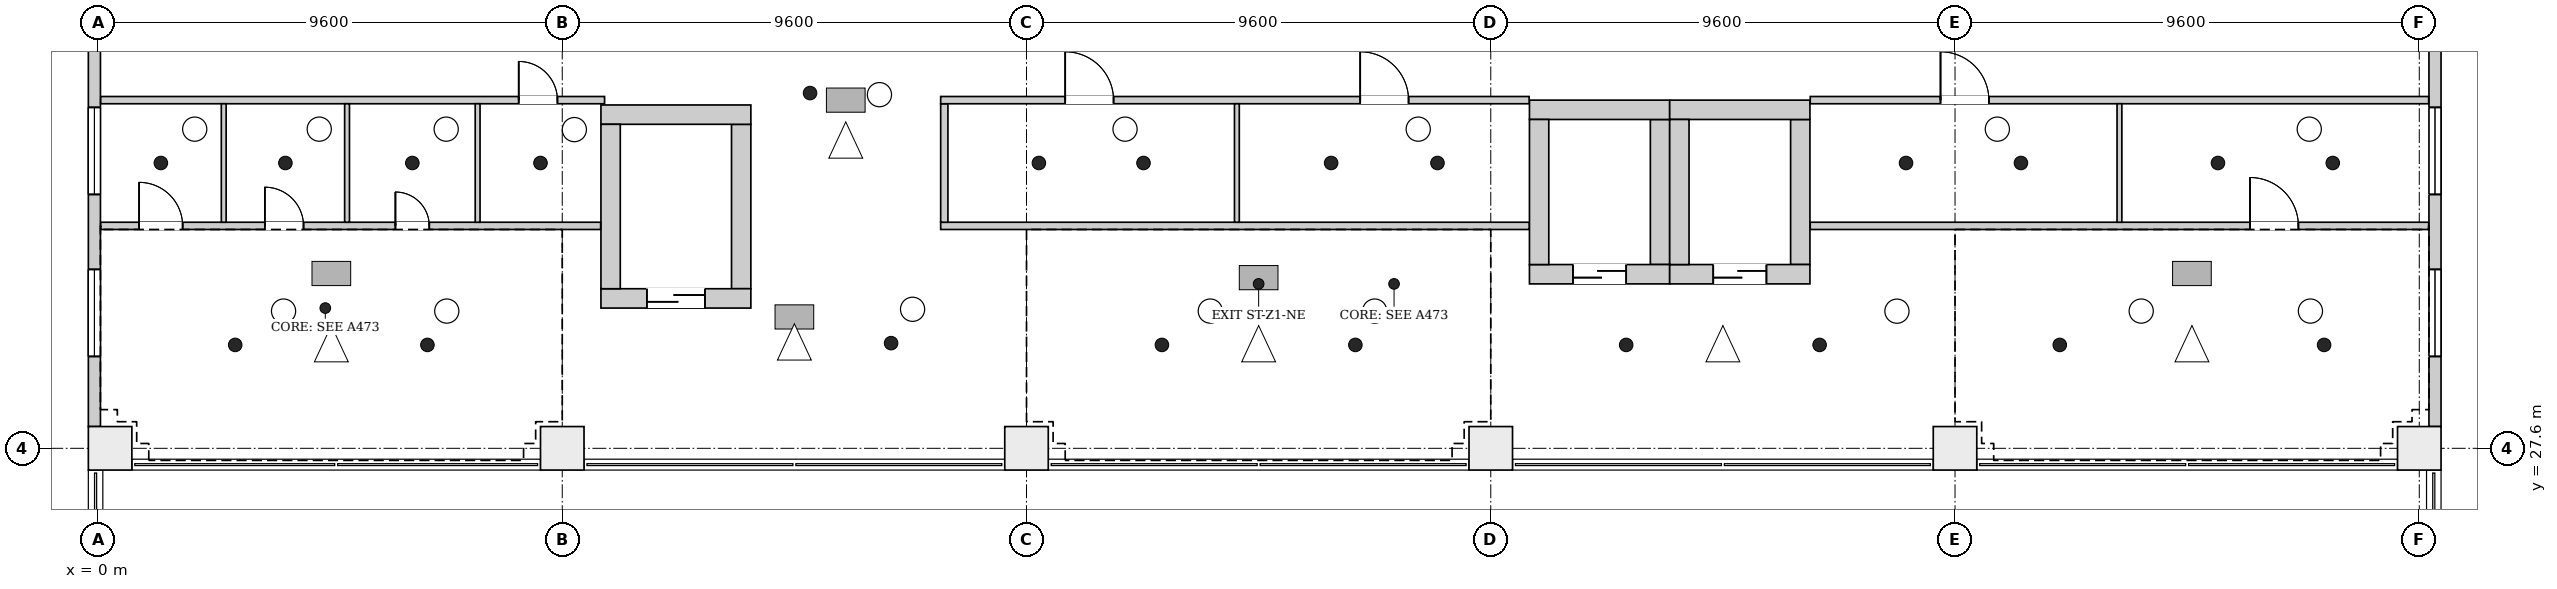
"""IFC4 building model, lengths in metres.
Left out: names, types, materials, properties, quantities, classifications, styles, units other than length and angle.
Written with IfcOpenShell. Run it as: python <this file> out.ifc"""

import sys

from ifc_helpers import new_model, si_unit, direction, frame, frame_2d, origin, origin_2d, place, context, subcontext, project, spatial, rectangle, extrude, element, fill, save


model = new_model("IFC4")
c1 = context("Model", 3, precision=1e-05, world=origin(), true_north=direction((0.0, 1.0)))
c2 = subcontext(c1, "Body", "Model", "MODEL_VIEW")
j1 = project(units=[si_unit("LENGTHUNIT", "METRE"), si_unit("PLANEANGLEUNIT", "RADIAN")], contexts=[c1])
p1 = place(None, origin())
s1 = spatial("IfcSite", under=j1, at=p1, CompositionType="ELEMENT")
p2 = place(p1, origin())
s2 = spatial("IfcBuilding", under=s1, at=p2, CompositionType="ELEMENT")
p3 = place(p2, frame((0.0, 0.0, 44.5)))
s3 = spatial("IfcBuildingStorey", under=s2, at=p3, CompositionType="ELEMENT", Elevation=44.5)
p4 = place(p3, frame((10.4, 30.7, 0.0), z_axis=(0.0, 0.0, 1.0), x_axis=(1.0, 0.0, 0.0)))
e1 = element("IfcWall", 1, at=p4, inside=s3, PredefinedType="SHEAR", context=c2, shape_type="SweptSolid", body=[
    extrude(rectangle(XDim=3.1, YDim=0.4, at=frame_2d((1.55, 0.0))), origin(), (0.0, 0.0, 1.0), 4.2),
])
p5 = place(p4, frame((0.95, 0.0, 0.0)))
e2 = element("IfcOpeningElement", 2, at=p5, cuts=e1, PredefinedType="OPENING", context=c2, shape_type="SweptSolid", body=[
    extrude(rectangle(XDim=1.2, YDim=2.1, at=frame_2d((0.6, 1.05))), frame((0.0, 0.21, 0.0), z_axis=(0.0, -1.0, 0.0), x_axis=(1.0, 0.0, 0.0)), (0.0, 0.0, 1.0), 0.42),
])
p6 = place(p3, frame((10.4, 34.5, 0.0), z_axis=(0.0, 0.0, 1.0), x_axis=(1.0, 0.0, 0.0)))
e3 = element("IfcWall", 3, at=p6, inside=s3, PredefinedType="SHEAR", context=c2, shape_type="SweptSolid", body=[
    extrude(rectangle(XDim=3.1, YDim=0.4, at=frame_2d((1.55, 0.0))), origin(), (0.0, 0.0, 1.0), 4.2),
])
for number, where, z_axis, x_axis in (
    (4, (10.6, 30.9, 0.0), (0.0, 0.0, 1.0), (0.0, 1.0, 0.0)),
    (5, (13.3, 30.9, 0.0), (0.0, 0.0, 1.0), (0.0, 1.0, 0.0)),
):
    element("IfcWall", number, at=place(p3, frame(where, z_axis=z_axis, x_axis=x_axis)), inside=s3, PredefinedType="SHEAR", context=c2, shape_type="SweptSolid", body=[
        extrude(rectangle(XDim=3.4, YDim=0.4, at=frame_2d((1.7, 0.0))), origin(), (0.0, 0.0, 1.0), 4.2),
    ])
p7 = place(p3, frame((29.6, 31.2, 0.0), z_axis=(0.0, 0.0, 1.0), x_axis=(1.0, 0.0, 0.0)))
e6 = element("IfcWall", 6, at=p7, inside=s3, PredefinedType="SHEAR", context=c2, shape_type="SweptSolid", body=[
    extrude(rectangle(XDim=2.9, YDim=0.4, at=frame_2d((1.45, 0.0))), origin(), (0.0, 0.0, 1.0), 4.2),
])
p8 = place(p7, frame((0.9, 0.0, 0.0)))
e7 = element("IfcOpeningElement", 7, at=p8, cuts=e6, PredefinedType="OPENING", context=c2, shape_type="SweptSolid", body=[
    extrude(rectangle(XDim=1.1, YDim=2.1, at=frame_2d((0.55, 1.05))), frame((0.0, 0.21, 0.0), z_axis=(0.0, -1.0, 0.0), x_axis=(1.0, 0.0, 0.0)), (0.0, 0.0, 1.0), 0.42),
])
p9 = place(p3, frame((29.6, 34.6, 0.0), z_axis=(0.0, 0.0, 1.0), x_axis=(1.0, 0.0, 0.0)))
e8 = element("IfcWall", 8, at=p9, inside=s3, PredefinedType="SHEAR", context=c2, shape_type="SweptSolid", body=[
    extrude(rectangle(XDim=2.9, YDim=0.4, at=frame_2d((1.45, 0.0))), origin(), (0.0, 0.0, 1.0), 4.2),
])
for number, where, z_axis, x_axis in (
    (9, (29.8, 31.4, 0.0), (0.0, 0.0, 1.0), (0.0, 1.0, 0.0)),
    (10, (32.3, 31.4, 0.0), (0.0, 0.0, 1.0), (0.0, 1.0, 0.0)),
):
    element("IfcWall", number, at=place(p3, frame(where, z_axis=z_axis, x_axis=x_axis)), inside=s3, PredefinedType="SHEAR", context=c2, shape_type="SweptSolid", body=[
        extrude(rectangle(XDim=3.0, YDim=0.4, at=frame_2d((1.5, 0.0))), origin(), (0.0, 0.0, 1.0), 4.2),
    ])
p10 = place(p3, frame((32.5, 31.2, 0.0), z_axis=(0.0, 0.0, 1.0), x_axis=(1.0, 0.0, 0.0)))
e11 = element("IfcWall", 11, at=p10, inside=s3, PredefinedType="SHEAR", context=c2, shape_type="SweptSolid", body=[
    extrude(rectangle(XDim=2.9, YDim=0.4, at=frame_2d((1.45, 0.0))), origin(), (0.0, 0.0, 1.0), 4.2),
])
p11 = place(p10, frame((0.9, 0.0, 0.0)))
e12 = element("IfcOpeningElement", 12, at=p11, cuts=e11, PredefinedType="OPENING", context=c2, shape_type="SweptSolid", body=[
    extrude(rectangle(XDim=1.1, YDim=2.1, at=frame_2d((0.55, 1.05))), frame((0.0, 0.21, 0.0), z_axis=(0.0, -1.0, 0.0), x_axis=(1.0, 0.0, 0.0)), (0.0, 0.0, 1.0), 0.42),
])
p12 = place(p3, frame((32.5, 34.6, 0.0), z_axis=(0.0, 0.0, 1.0), x_axis=(1.0, 0.0, 0.0)))
e13 = element("IfcWall", 13, at=p12, inside=s3, PredefinedType="SHEAR", context=c2, shape_type="SweptSolid", body=[
    extrude(rectangle(XDim=2.9, YDim=0.4, at=frame_2d((1.45, 0.0))), origin(), (0.0, 0.0, 1.0), 4.2),
])
for number, where, z_axis, x_axis in (
    (14, (32.7, 31.4, 0.0), (0.0, 0.0, 1.0), (0.0, 1.0, 0.0)),
    (15, (35.2, 31.4, 0.0), (0.0, 0.0, 1.0), (0.0, 1.0, 0.0)),
):
    element("IfcWall", number, at=place(p3, frame(where, z_axis=z_axis, x_axis=x_axis)), inside=s3, PredefinedType="SHEAR", context=c2, shape_type="SweptSolid", body=[
        extrude(rectangle(XDim=3.0, YDim=0.4, at=frame_2d((1.5, 0.0))), origin(), (0.0, 0.0, 1.0), 4.2),
    ])
for number, where, z_axis, x_axis in (
    (16, (0.25, 27.6, 0.0), (0.0, 0.0, 1.0), (1.0, 0.0, 0.0)),
    (17, (9.6, 27.6, 0.0), (0.0, 0.0, 1.0), (1.0, 0.0, 0.0)),
    (18, (19.2, 27.6, 0.0), (0.0, 0.0, 1.0), (1.0, 0.0, 0.0)),
    (19, (28.8, 27.6, 0.0), (0.0, 0.0, 1.0), (1.0, 0.0, 0.0)),
    (20, (38.4, 27.6, 0.0), (0.0, 0.0, 1.0), (1.0, 0.0, 0.0)),
    (21, (48.0, 27.6, 0.0), (0.0, 0.0, 1.0), (1.0, 0.0, 0.0)),
):
    element("IfcColumn", number, at=place(p3, frame(where, z_axis=z_axis, x_axis=x_axis)), inside=s3, PredefinedType="COLUMN", context=c2, shape_type="SweptSolid", body=[
        extrude(rectangle(XDim=0.9, YDim=0.9, at=origin_2d()), origin(), (0.0, 0.0, 1.0), 4.2),
    ])
p13 = place(p3, frame((-0.074, 36.35, 0.0), z_axis=(0.0, 0.0, 1.0), x_axis=(0.0, -1.0, 0.0)))
e22 = element("IfcWall", 22, at=p13, inside=s3, PredefinedType="ELEMENTEDWALL", context=c2, shape_type="SweptSolid", body=[
    extrude(rectangle(XDim=8.3, YDim=0.25, at=frame_2d((4.15, 0.0))), origin(), (0.0, 0.0, 1.0), 3.9),
])
p14 = place(p13, frame((5.05, 0.0, 0.9)))
e23 = element("IfcOpeningElement", 23, at=p14, cuts=e22, PredefinedType="OPENING", context=c2, shape_type="SweptSolid", body=[
    extrude(rectangle(XDim=1.8, YDim=2.6, at=frame_2d((0.9, 1.3))), frame((0.0, 0.135, 0.0), z_axis=(0.0, -1.0, 0.0), x_axis=(1.0, 0.0, 0.0)), (0.0, 0.0, 1.0), 0.27),
])
p15 = place(p13, frame((1.7, 0.0, 0.9)))
e24 = element("IfcOpeningElement", 24, at=p15, cuts=e22, PredefinedType="OPENING", context=c2, shape_type="SweptSolid", body=[
    extrude(rectangle(XDim=1.8, YDim=2.6, at=frame_2d((0.9, 1.3))), frame((0.0, 0.135, 0.0), z_axis=(0.0, -1.0, 0.0), x_axis=(1.0, 0.0, 0.0)), (0.0, 0.0, 1.0), 0.27),
])
p16 = place(p3, frame((48.325, 28.05, 0.0), z_axis=(0.0, 0.0, 1.0), x_axis=(0.0, 1.0, 0.0)))
e25 = element("IfcWall", 25, at=p16, inside=s3, PredefinedType="ELEMENTEDWALL", context=c2, shape_type="SweptSolid", body=[
    extrude(rectangle(XDim=8.3, YDim=0.25, at=frame_2d((4.15, 0.0))), origin(), (0.0, 0.0, 1.0), 3.9),
])
p17 = place(p16, frame((1.45, 0.0, 0.9)))
e26 = element("IfcOpeningElement", 26, at=p17, cuts=e25, PredefinedType="OPENING", context=c2, shape_type="SweptSolid", body=[
    extrude(rectangle(XDim=1.8, YDim=2.6, at=frame_2d((0.9, 1.3))), frame((0.0, 0.135, 0.0), z_axis=(0.0, -1.0, 0.0), x_axis=(1.0, 0.0, 0.0)), (0.0, 0.0, 1.0), 0.27),
])
p18 = place(p16, frame((4.8, 0.0, 0.9)))
e27 = element("IfcOpeningElement", 27, at=p18, cuts=e25, PredefinedType="OPENING", context=c2, shape_type="SweptSolid", body=[
    extrude(rectangle(XDim=1.8, YDim=2.6, at=frame_2d((0.9, 1.3))), frame((0.0, 0.135, 0.0), z_axis=(0.0, -1.0, 0.0), x_axis=(1.0, 0.0, 0.0)), (0.0, 0.0, 1.0), 0.27),
])
p19 = place(p3, frame((0.056, 32.2, 0.0), z_axis=(0.0, 0.0, 1.0), x_axis=(1.0, 0.0, 0.0)))
e28 = element("IfcWall", 28, at=p19, inside=s3, PredefinedType="PARTITIONING", context=c2, shape_type="SweptSolid", body=[
    extrude(rectangle(XDim=10.338, YDim=0.15, at=frame_2d((5.169, 0.0))), origin(), (0.0, 0.0, 1.0), 3.9),
])
p20 = place(p19, frame((0.794, 0.0, 0.0)))
e29 = element("IfcOpeningElement", 29, at=p20, cuts=e28, PredefinedType="OPENING", context=c2, shape_type="SweptSolid", body=[
    extrude(rectangle(XDim=0.9, YDim=2.1, at=frame_2d((0.45, 1.05))), frame((0.0, 0.085, 0.0), z_axis=(0.0, -1.0, 0.0), x_axis=(1.0, 0.0, 0.0)), (0.0, 0.0, 1.0), 0.17),
])
p21 = place(p19, frame((3.394, 0.0, 0.0)))
e30 = element("IfcOpeningElement", 30, at=p21, cuts=e28, PredefinedType="OPENING", context=c2, shape_type="SweptSolid", body=[
    extrude(rectangle(XDim=0.8, YDim=2.1, at=frame_2d((0.4, 1.05))), frame((0.0, 0.085, 0.0), z_axis=(0.0, -1.0, 0.0), x_axis=(1.0, 0.0, 0.0)), (0.0, 0.0, 1.0), 0.17),
])
p22 = place(p19, frame((6.094, 0.0, 0.0)))
e31 = element("IfcOpeningElement", 31, at=p22, cuts=e28, PredefinedType="OPENING", context=c2, shape_type="SweptSolid", body=[
    extrude(rectangle(XDim=0.7, YDim=2.1, at=frame_2d((0.35, 1.05))), frame((0.0, 0.085, 0.0), z_axis=(0.0, -1.0, 0.0), x_axis=(1.0, 0.0, 0.0)), (0.0, 0.0, 1.0), 0.17),
])
p23 = place(p3, frame((0.056, 34.8, 0.0), z_axis=(0.0, 0.0, 1.0), x_axis=(1.0, 0.0, 0.0)))
e32 = element("IfcWall", 32, at=p23, inside=s3, PredefinedType="PARTITIONING", context=c2, shape_type="SweptSolid", body=[
    extrude(rectangle(XDim=10.419, YDim=0.15, at=frame_2d((5.209, 0.0))), origin(), (0.0, 0.0, 1.0), 3.9),
])
p24 = place(p23, frame((8.644, 0.0, 0.0)))
e33 = element("IfcOpeningElement", 33, at=p24, cuts=e32, PredefinedType="OPENING", context=c2, shape_type="SweptSolid", body=[
    extrude(rectangle(XDim=0.8, YDim=2.1, at=frame_2d((0.4, 1.05))), frame((0.0, 0.085, 0.0), z_axis=(0.0, -1.0, 0.0), x_axis=(1.0, 0.0, 0.0)), (0.0, 0.0, 1.0), 0.17),
])
for number, where, z_axis, x_axis in (
    (34, (2.6, 32.275, 0.0), (0.0, 0.0, 1.0), (0.0, 1.0, 0.0)),
    (35, (5.15, 32.275, 0.0), (0.0, 0.0, 1.0), (0.0, 1.0, 0.0)),
    (36, (7.85, 32.275, 0.0), (0.0, 0.0, 1.0), (0.0, 1.0, 0.0)),
):
    element("IfcWall", number, at=place(p3, frame(where, z_axis=z_axis, x_axis=x_axis)), inside=s3, PredefinedType="PARTITIONING", context=c2, shape_type="SweptSolid", body=[
        extrude(rectangle(XDim=2.45, YDim=0.1, at=frame_2d((1.225, 0.0))), origin(), (0.0, 0.0, 1.0), 3.9),
    ])
p25 = place(p3, frame((17.425, 32.2, 0.0), z_axis=(0.0, 0.0, 1.0), x_axis=(1.0, 0.0, 0.0)))
e37 = element("IfcWall", 37, at=p25, inside=s3, PredefinedType="PARTITIONING", context=c2, shape_type="SweptSolid", body=[
    extrude(rectangle(XDim=12.169, YDim=0.15, at=frame_2d((6.084, 0.0))), origin(), (0.0, 0.0, 1.0), 3.9),
])
p26 = place(p3, frame((17.5, 32.275, 0.0), z_axis=(0.0, 0.0, 1.0), x_axis=(0.0, 1.0, 0.0)))
e38 = element("IfcWall", 38, at=p26, inside=s3, PredefinedType="PARTITIONING", context=c2, shape_type="SweptSolid", body=[
    extrude(rectangle(XDim=2.45, YDim=0.15, at=frame_2d((1.225, 0.0))), origin(), (0.0, 0.0, 1.0), 3.9),
])
p27 = place(p3, frame((17.425, 34.8, 0.0), z_axis=(0.0, 0.0, 1.0), x_axis=(1.0, 0.0, 0.0)))
e39 = element("IfcWall", 39, at=p27, inside=s3, PredefinedType="PARTITIONING", context=c2, shape_type="SweptSolid", body=[
    extrude(rectangle(XDim=12.169, YDim=0.15, at=frame_2d((6.084, 0.0))), origin(), (0.0, 0.0, 1.0), 3.9),
])
p28 = place(p27, frame((2.575, 0.0, 0.0)))
e40 = element("IfcOpeningElement", 40, at=p28, cuts=e39, PredefinedType="OPENING", context=c2, shape_type="SweptSolid", body=[
    extrude(rectangle(XDim=1.0, YDim=2.1, at=frame_2d((0.5, 1.05))), frame((0.0, 0.085, 0.0), z_axis=(0.0, -1.0, 0.0), x_axis=(1.0, 0.0, 0.0)), (0.0, 0.0, 1.0), 0.17),
])
p29 = place(p27, frame((8.675, 0.0, 0.0)))
e41 = element("IfcOpeningElement", 41, at=p29, cuts=e39, PredefinedType="OPENING", context=c2, shape_type="SweptSolid", body=[
    extrude(rectangle(XDim=1.0, YDim=2.1, at=frame_2d((0.5, 1.05))), frame((0.0, 0.085, 0.0), z_axis=(0.0, -1.0, 0.0), x_axis=(1.0, 0.0, 0.0)), (0.0, 0.0, 1.0), 0.17),
])
p30 = place(p3, frame((23.55, 32.275, 0.0), z_axis=(0.0, 0.0, 1.0), x_axis=(0.0, 1.0, 0.0)))
e42 = element("IfcWall", 42, at=p30, inside=s3, PredefinedType="PARTITIONING", context=c2, shape_type="SweptSolid", body=[
    extrude(rectangle(XDim=2.45, YDim=0.1, at=frame_2d((1.225, 0.0))), origin(), (0.0, 0.0, 1.0), 3.9),
])
p31 = place(p3, frame((35.406, 32.2, 0.0), z_axis=(0.0, 0.0, 1.0), x_axis=(1.0, 0.0, 0.0)))
e43 = element("IfcWall", 43, at=p31, inside=s3, PredefinedType="PARTITIONING", context=c2, shape_type="SweptSolid", body=[
    extrude(rectangle(XDim=12.788, YDim=0.15, at=frame_2d((6.394, 0.0))), origin(), (0.0, 0.0, 1.0), 3.9),
])
p32 = place(p31, frame((9.094, 0.0, 0.0)))
e44 = element("IfcOpeningElement", 44, at=p32, cuts=e43, PredefinedType="OPENING", context=c2, shape_type="SweptSolid", body=[
    extrude(rectangle(XDim=1.0, YDim=2.1, at=frame_2d((0.5, 1.05))), frame((0.0, 0.085, 0.0), z_axis=(0.0, -1.0, 0.0), x_axis=(1.0, 0.0, 0.0)), (0.0, 0.0, 1.0), 0.17),
])
p33 = place(p3, frame((35.406, 34.8, 0.0), z_axis=(0.0, 0.0, 1.0), x_axis=(1.0, 0.0, 0.0)))
e45 = element("IfcWall", 45, at=p33, inside=s3, PredefinedType="PARTITIONING", context=c2, shape_type="SweptSolid", body=[
    extrude(rectangle(XDim=12.788, YDim=0.15, at=frame_2d((6.394, 0.0))), origin(), (0.0, 0.0, 1.0), 3.9),
])
p34 = place(p33, frame((2.694, 0.0, 0.0)))
e46 = element("IfcOpeningElement", 46, at=p34, cuts=e45, PredefinedType="OPENING", context=c2, shape_type="SweptSolid", body=[
    extrude(rectangle(XDim=1.0, YDim=2.1, at=frame_2d((0.5, 1.05))), frame((0.0, 0.085, 0.0), z_axis=(0.0, -1.0, 0.0), x_axis=(1.0, 0.0, 0.0)), (0.0, 0.0, 1.0), 0.17),
])
p35 = place(p3, frame((41.8, 32.275, 0.0), z_axis=(0.0, 0.0, 1.0), x_axis=(0.0, 1.0, 0.0)))
e47 = element("IfcWall", 47, at=p35, inside=s3, PredefinedType="PARTITIONING", context=c2, shape_type="SweptSolid", body=[
    extrude(rectangle(XDim=2.45, YDim=0.1, at=frame_2d((1.225, 0.0))), origin(), (0.0, 0.0, 1.0), 3.9),
])
p36 = place(p14, origin())
e48 = element("IfcWindow", 48, at=p36, inside=s3, PartitioningType="SINGLE_PANEL", PredefinedType="WINDOW", context=c2, shape_type="SweptSolid", body=[
    extrude(rectangle(XDim=1.8, YDim=2.6, at=frame_2d((0.9, 1.3))), frame((0.0, 0.03, 0.0), z_axis=(0.0, -1.0, 0.0), x_axis=(1.0, 0.0, 0.0)), (0.0, 0.0, 1.0), 0.06),
])
fill(e23, e48)
p37 = place(p15, origin())
e49 = element("IfcWindow", 49, at=p37, inside=s3, PartitioningType="SINGLE_PANEL", PredefinedType="WINDOW", context=c2, shape_type="SweptSolid", body=[
    extrude(rectangle(XDim=1.8, YDim=2.6, at=frame_2d((0.9, 1.3))), frame((0.0, 0.03, 0.0), z_axis=(0.0, -1.0, 0.0), x_axis=(1.0, 0.0, 0.0)), (0.0, 0.0, 1.0), 0.06),
])
fill(e24, e49)
p38 = place(p17, origin())
e50 = element("IfcWindow", 50, at=p38, inside=s3, PartitioningType="SINGLE_PANEL", PredefinedType="WINDOW", context=c2, shape_type="SweptSolid", body=[
    extrude(rectangle(XDim=1.8, YDim=2.6, at=frame_2d((0.9, 1.3))), frame((0.0, 0.03, 0.0), z_axis=(0.0, -1.0, 0.0), x_axis=(1.0, 0.0, 0.0)), (0.0, 0.0, 1.0), 0.06),
])
fill(e26, e50)
p39 = place(p18, origin())
e51 = element("IfcWindow", 51, at=p39, inside=s3, PartitioningType="SINGLE_PANEL", PredefinedType="WINDOW", context=c2, shape_type="SweptSolid", body=[
    extrude(rectangle(XDim=1.8, YDim=2.6, at=frame_2d((0.9, 1.3))), frame((0.0, 0.03, 0.0), z_axis=(0.0, -1.0, 0.0), x_axis=(1.0, 0.0, 0.0)), (0.0, 0.0, 1.0), 0.06),
])
fill(e27, e51)
p40 = place(p5, origin())
e52 = element("IfcDoor", 52, at=p40, inside=s3, OperationType="DOUBLE_DOOR_SLIDING", PredefinedType="DOOR", context=c2, shape_type="SweptSolid", body=[
    extrude(rectangle(XDim=1.2, YDim=2.1, at=frame_2d((0.6, 1.05))), frame((0.0, 0.025, 0.0), z_axis=(0.0, -1.0, 0.0), x_axis=(1.0, 0.0, 0.0)), (0.0, 0.0, 1.0), 0.05),
])
fill(e2, e52)
p41 = place(p8, origin())
e53 = element("IfcDoor", 53, at=p41, inside=s3, OperationType="DOUBLE_DOOR_SLIDING", PredefinedType="DOOR", context=c2, shape_type="SweptSolid", body=[
    extrude(rectangle(XDim=1.1, YDim=2.1, at=frame_2d((0.55, 1.05))), frame((0.0, 0.025, 0.0), z_axis=(0.0, -1.0, 0.0), x_axis=(1.0, 0.0, 0.0)), (0.0, 0.0, 1.0), 0.05),
])
fill(e7, e53)
p42 = place(p11, origin())
e54 = element("IfcDoor", 54, at=p42, inside=s3, OperationType="DOUBLE_DOOR_SLIDING", PredefinedType="DOOR", context=c2, shape_type="SweptSolid", body=[
    extrude(rectangle(XDim=1.1, YDim=2.1, at=frame_2d((0.55, 1.05))), frame((0.0, 0.025, 0.0), z_axis=(0.0, -1.0, 0.0), x_axis=(1.0, 0.0, 0.0)), (0.0, 0.0, 1.0), 0.05),
])
fill(e12, e54)
p43 = place(p20, origin())
e55 = element("IfcDoor", 55, at=p43, inside=s3, OperationType="SINGLE_SWING_RIGHT", PredefinedType="DOOR", context=c2, shape_type="SweptSolid", body=[
    extrude(rectangle(XDim=0.9, YDim=2.1, at=frame_2d((0.45, 1.05))), frame((0.0, 0.025, 0.0), z_axis=(0.0, -1.0, 0.0), x_axis=(1.0, 0.0, 0.0)), (0.0, 0.0, 1.0), 0.05),
])
fill(e29, e55)
p44 = place(p21, origin())
e56 = element("IfcDoor", 56, at=p44, inside=s3, OperationType="SINGLE_SWING_RIGHT", PredefinedType="DOOR", context=c2, shape_type="SweptSolid", body=[
    extrude(rectangle(XDim=0.8, YDim=2.1, at=frame_2d((0.4, 1.05))), frame((0.0, 0.025, 0.0), z_axis=(0.0, -1.0, 0.0), x_axis=(1.0, 0.0, 0.0)), (0.0, 0.0, 1.0), 0.05),
])
fill(e30, e56)
p45 = place(p22, origin())
e57 = element("IfcDoor", 57, at=p45, inside=s3, OperationType="SINGLE_SWING_RIGHT", PredefinedType="DOOR", context=c2, shape_type="SweptSolid", body=[
    extrude(rectangle(XDim=0.7, YDim=2.1, at=frame_2d((0.35, 1.05))), frame((0.0, 0.025, 0.0), z_axis=(0.0, -1.0, 0.0), x_axis=(1.0, 0.0, 0.0)), (0.0, 0.0, 1.0), 0.05),
])
fill(e31, e57)
p46 = place(p24, origin())
e58 = element("IfcDoor", 58, at=p46, inside=s3, OperationType="SINGLE_SWING_LEFT", PredefinedType="DOOR", context=c2, shape_type="SweptSolid", body=[
    extrude(rectangle(XDim=0.8, YDim=2.1, at=frame_2d((0.4, 1.05))), frame((0.0, 0.025, 0.0), z_axis=(0.0, -1.0, 0.0), x_axis=(1.0, 0.0, 0.0)), (0.0, 0.0, 1.0), 0.05),
])
fill(e33, e58)
p47 = place(p28, origin())
e59 = element("IfcDoor", 59, at=p47, inside=s3, OperationType="SINGLE_SWING_LEFT", PredefinedType="DOOR", context=c2, shape_type="SweptSolid", body=[
    extrude(rectangle(XDim=1.0, YDim=2.1, at=frame_2d((0.5, 1.05))), frame((0.0, 0.025, 0.0), z_axis=(0.0, -1.0, 0.0), x_axis=(1.0, 0.0, 0.0)), (0.0, 0.0, 1.0), 0.05),
])
fill(e40, e59)
p48 = place(p29, origin())
e60 = element("IfcDoor", 60, at=p48, inside=s3, OperationType="SINGLE_SWING_LEFT", PredefinedType="DOOR", context=c2, shape_type="SweptSolid", body=[
    extrude(rectangle(XDim=1.0, YDim=2.1, at=frame_2d((0.5, 1.05))), frame((0.0, 0.025, 0.0), z_axis=(0.0, -1.0, 0.0), x_axis=(1.0, 0.0, 0.0)), (0.0, 0.0, 1.0), 0.05),
])
fill(e41, e60)
p49 = place(p34, origin())
e61 = element("IfcDoor", 61, at=p49, inside=s3, OperationType="SINGLE_SWING_RIGHT", PredefinedType="DOOR", context=c2, shape_type="SweptSolid", body=[
    extrude(rectangle(XDim=1.0, YDim=2.1, at=frame_2d((0.5, 1.05))), frame((0.0, 0.025, 0.0), z_axis=(0.0, -1.0, 0.0), x_axis=(1.0, 0.0, 0.0)), (0.0, 0.0, 1.0), 0.05),
])
fill(e46, e61)
p50 = place(p32, origin())
e62 = element("IfcDoor", 62, at=p50, inside=s3, OperationType="SINGLE_SWING_RIGHT", PredefinedType="DOOR", context=c2, shape_type="SweptSolid", body=[
    extrude(rectangle(XDim=1.0, YDim=2.1, at=frame_2d((0.5, 1.05))), frame((0.0, 0.025, 0.0), z_axis=(0.0, -1.0, 0.0), x_axis=(1.0, 0.0, 0.0)), (0.0, 0.0, 1.0), 0.05),
])
fill(e44, e62)
save(model, sys.argv[1])
